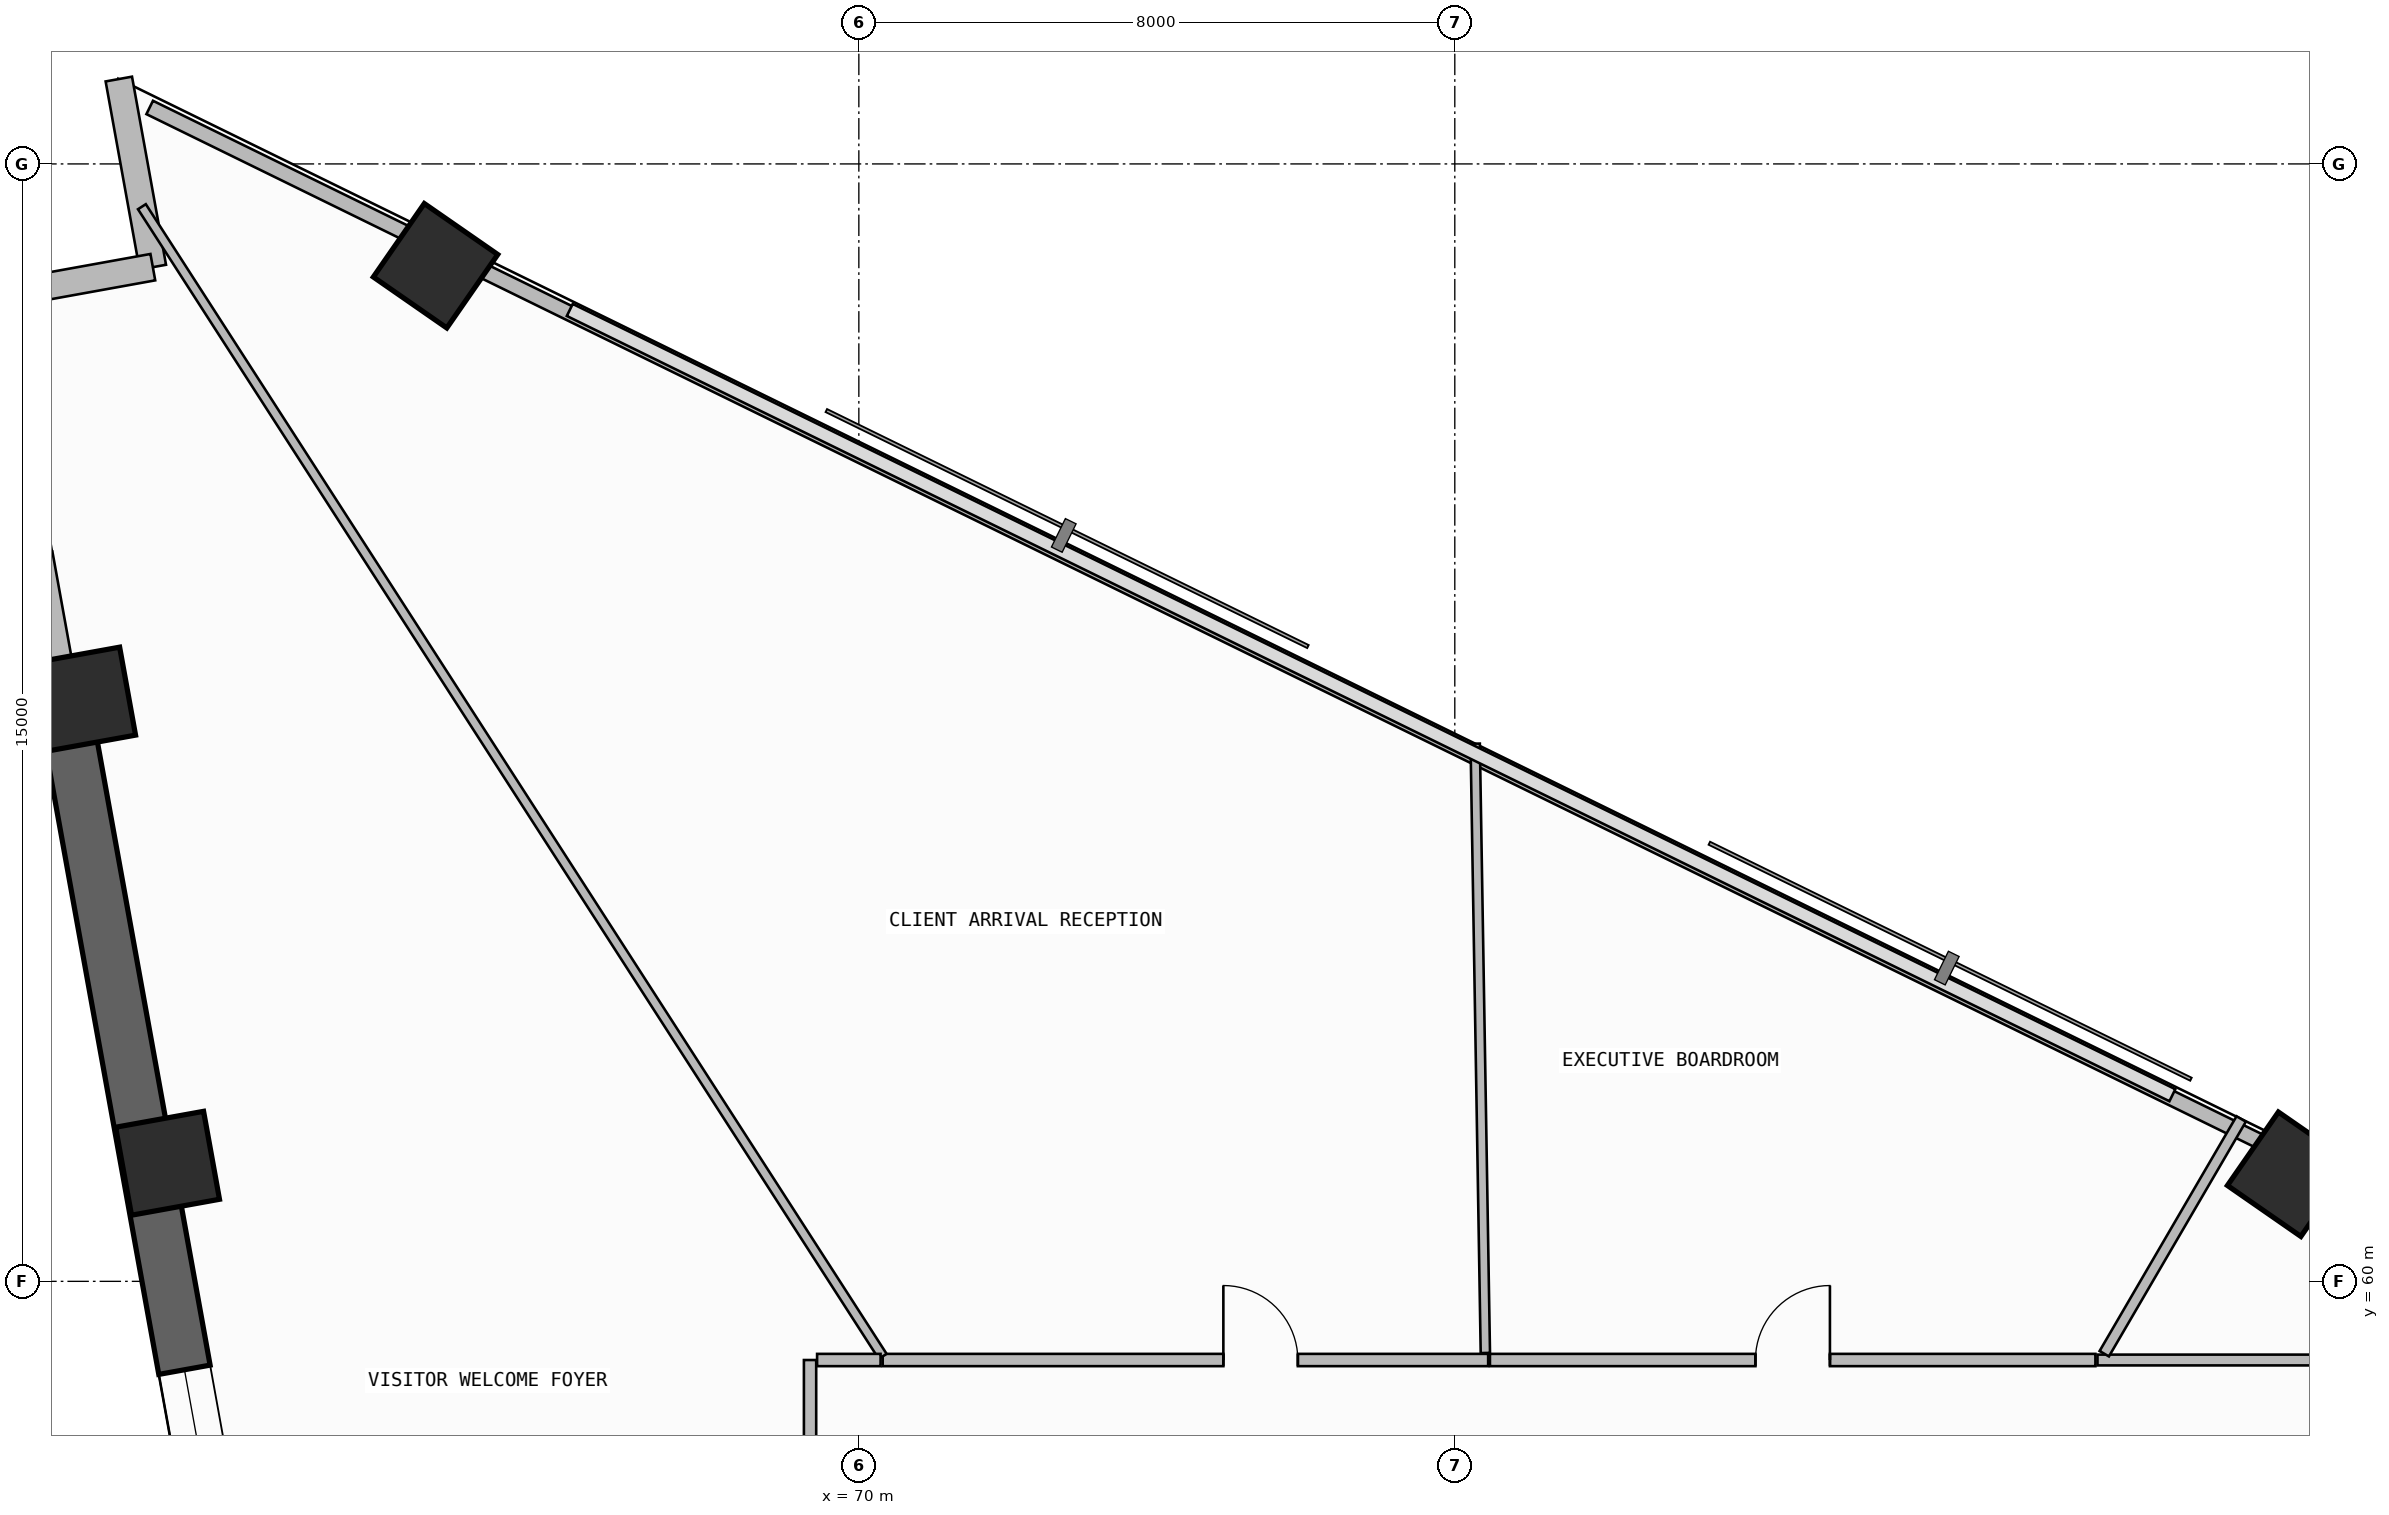
"""IFC4 building model, lengths in metres.
Left out: names, types, materials, properties, quantities, classifications, styles, units other than length and angle.
Written with IfcOpenShell. Run it as: python <this file> out.ifc"""

import sys

from ifc_helpers import new_model, si_unit, direction, frame, frame_2d, origin, origin_2d, place, context, subcontext, project, spatial, rectangle, extrude, element, fill, save


model = new_model("IFC4")
c1 = context("Model", 3, precision=1e-05, world=origin(), true_north=direction((0.0, 1.0)))
c2 = subcontext(c1, "Body", "Model", "MODEL_VIEW")
j1 = project(units=[si_unit("LENGTHUNIT", "METRE"), si_unit("PLANEANGLEUNIT", "RADIAN")], contexts=[c1])
p1 = place(None, origin())
s1 = spatial("IfcSite", under=j1, at=p1, CompositionType="ELEMENT")
p2 = place(p1, origin())
s2 = spatial("IfcBuilding", under=s1, at=p2, CompositionType="ELEMENT")
p3 = place(p2, frame((0.0, 0.0, 95.7)))
s3 = spatial("IfcBuildingStorey", under=s2, at=p3, CompositionType="ELEMENT", Elevation=95.7)
p4 = place(p3, frame((89.207, 61.438, 0.0), z_axis=(0.0, 0.0, 1.0), x_axis=(0.569996762596, 0.821646937942, 0.0)))
e1 = element("IfcColumn", 1, at=p4, inside=s3, PredefinedType="COLUMN", context=c2, shape_type="SweptSolid", body=[
    extrude(rectangle(XDim=1.2, YDim=1.2, at=origin_2d()), origin(), (0.0, 0.0, 1.0), 3.6),
])
for number, where, z_axis, x_axis in (
    (2, (64.318, 73.633, -0.4), (0.0, 0.0, 1.0), (0.57, 0.822, 0.0)),
    (3, (59.594, 67.816, -0.4), (0.0, 0.0, 1.0), (-0.178, 0.984, 0.0)),
    (4, (60.72, 61.585, -0.4), (0.0, 0.0, 1.0), (-0.178, 0.984, 0.0)),
):
    element("IfcColumn", number, at=place(p3, frame(where, z_axis=z_axis, x_axis=x_axis)), inside=s3, PredefinedType="COLUMN", context=c2, shape_type="SweptSolid", body=[
        extrude(rectangle(XDim=1.2, YDim=1.2, at=origin_2d()), origin(), (0.0, 0.0, 1.0), 4.0),
    ])
p5 = place(p3, frame((58.342, 73.22, 0.0), z_axis=(0.0, 0.0, 1.0), x_axis=(0.177981837245, -0.984033772597, 0.0)))
e5 = element("IfcWall", 5, at=p5, inside=s3, PredefinedType="SOLIDWALL", context=c2, shape_type="SweptSolid", body=[
    extrude(rectangle(XDim=5.54, YDim=0.42, at=frame_2d((2.77, 0.0))), origin(), (0.0, 0.0, 1.0), 2.725),
])
p6 = place(p5, frame((1.118, 0.0, 1.2)))
e6 = element("IfcOpeningElement", 6, at=p6, cuts=e5, PredefinedType="OPENING", context=c2, shape_type="SweptSolid", body=[
    extrude(rectangle(XDim=2.4, YDim=0.9, at=frame_2d((1.2, 0.45))), frame((0.0, 0.22, 0.0), z_axis=(0.0, -1.0, 0.0), x_axis=(1.0, 0.0, 0.0)), (0.0, 0.0, 1.0), 0.44),
])
p7 = place(p3, frame((59.328, 67.768, -0.4), z_axis=(0.0, 0.0, 1.0), x_axis=(0.177933213615, -0.984042565895, 0.0)))
e7 = element("IfcWall", 7, at=p7, inside=s3, PredefinedType="SHEAR", context=c2, shape_type="SweptSolid", body=[
    extrude(rectangle(XDim=20.579, YDim=0.7, at=frame_2d((10.289, 0.0))), origin(), (0.0, 0.0, 1.0), 3.74),
])
p8 = place(p7, frame((9.1, 0.0, 1.2)))
e8 = element("IfcOpeningElement", 8, at=p8, cuts=e7, PredefinedType="OPENING", context=c2, shape_type="SweptSolid", body=[
    extrude(rectangle(XDim=2.4, YDim=0.9, at=frame_2d((1.2, 0.45))), frame((0.0, 0.36, 0.0), z_axis=(0.0, -1.0, 0.0), x_axis=(1.0, 0.0, 0.0)), (0.0, 0.0, 1.0), 0.72),
])
p9 = place(p3, frame((60.066, 76.139, 0.0), z_axis=(0.0, 0.0, 1.0), x_axis=(0.177897493713, -0.984049024048, 0.0)))
e9 = element("IfcWall", 9, at=p9, inside=s3, PredefinedType="SOLIDWALL", context=c2, shape_type="SweptSolid", body=[
    extrude(rectangle(XDim=2.566, YDim=0.36, at=frame_2d((1.283, 0.0))), origin(), (0.0, 0.0, 1.0), 3.34),
])
p10 = place(p3, frame((60.523, 73.614, 0.0), z_axis=(0.0, 0.0, 1.0), x_axis=(-0.984046012923, -0.177914149102, 0.0)))
e10 = element("IfcWall", 10, at=p10, inside=s3, PredefinedType="SOLIDWALL", context=c2, shape_type="SweptSolid", body=[
    extrude(rectangle(XDim=2.566, YDim=0.36, at=frame_2d((1.283, 0.0))), origin(), (0.0, 0.0, 1.0), 3.34),
])
p11 = place(p3, frame((88.921, 61.823, 0.0), z_axis=(0.0, 0.0, 1.0), x_axis=(-0.897993533426, 0.440008652103, 0.0)))
e11 = element("IfcWall", 11, at=p11, inside=s3, PredefinedType="PARAPET", context=c2, shape_type="SweptSolid", body=[
    extrude(rectangle(XDim=26.864, YDim=0.2, at=frame_2d((13.432, 0.0))), origin(), (0.0, 0.0, 1.0), 1.15),
])
p12 = place(p3, frame((64.032, 74.018, 0.0), z_axis=(0.0, 0.0, 1.0), x_axis=(-0.89799103332, 0.440013754417, 0.0)))
e12 = element("IfcWall", 12, at=p12, inside=s3, PredefinedType="PARAPET", context=c2, shape_type="SweptSolid", body=[
    extrude(rectangle(XDim=3.955, YDim=0.2, at=frame_2d((1.978, 0.0))), origin(), (0.0, 0.0, 1.0), 1.15),
])
p13 = place(p3, frame((93.37, 58.944, 0.0), z_axis=(0.0, 0.0, 1.0), x_axis=(-1.0, 0.0, 0.0)))
e13 = element("IfcWall", 13, at=p13, inside=s3, PredefinedType="PARTITIONING", context=c2, shape_type="SweptSolid", body=[
    extrude(rectangle(XDim=6.743, YDim=0.145, at=frame_2d((3.372, 0.0))), origin(), (0.0, 0.0, 1.0), 2.725),
])
p14 = place(p3, frame((86.718, 59.029, 0.0), z_axis=(0.0, 0.0, 1.0), x_axis=(0.503866864473, 0.863781328165, 0.0)))
e14 = element("IfcWall", 14, at=p14, inside=s3, PredefinedType="PARTITIONING", context=c2, shape_type="SweptSolid", body=[
    extrude(rectangle(XDim=3.648, YDim=0.145, at=frame_2d((1.824, 0.0))), origin(), (0.0, 0.0, 1.0), 3.34),
])
p15 = place(p3, frame((78.448, 58.944, 0.0), z_axis=(0.0, 0.0, 1.0), x_axis=(-1.0, 0.0, 0.0)))
e15 = element("IfcWall", 15, at=p15, inside=s3, PredefinedType="PARTITIONING", context=c2, shape_type="SweptSolid", body=[
    extrude(rectangle(XDim=8.127, YDim=0.165, at=frame_2d((4.064, 0.0))), origin(), (0.0, 0.0, 1.0), 2.725),
])
p16 = place(p15, frame((2.555, 0.0, 0.0)))
e16 = element("IfcOpeningElement", 16, at=p16, cuts=e15, PredefinedType="OPENING", context=c2, shape_type="SweptSolid", body=[
    extrude(rectangle(XDim=1.0, YDim=2.2, at=frame_2d((0.5, 1.1))), frame((0.0, 0.093, 0.0), z_axis=(0.0, -1.0, 0.0), x_axis=(1.0, 0.0, 0.0)), (0.0, 0.0, 1.0), 0.185),
])
p17 = place(p3, frame((78.274, 67.218, 0.0), z_axis=(0.0, 0.0, 1.0), x_axis=(0.016682750971, -0.999860833226, 0.0)))
e17 = element("IfcWall", 17, at=p17, inside=s3, PredefinedType="PARTITIONING", context=c2, shape_type="SweptSolid", body=[
    extrude(rectangle(XDim=8.181, YDim=0.125, at=frame_2d((4.09, 0.0))), origin(), (0.0, 0.0, 1.0), 3.34),
])
p18 = place(p3, frame((70.32, 58.993, 0.0), z_axis=(0.0, 0.0, 1.0), x_axis=(-0.54165184829, 0.840602923647, 0.0)))
e18 = element("IfcWall", 18, at=p18, inside=s3, PredefinedType="PARTITIONING", context=c2, shape_type="SweptSolid", body=[
    extrude(rectangle(XDim=18.359, YDim=0.125, at=frame_2d((9.18, 0.0))), origin(), (0.0, 0.0, 1.0), 2.725),
])
p19 = place(p3, frame((86.599, 58.944, 0.0), z_axis=(0.0, 0.0, 1.0), x_axis=(-1.0, 0.0, 0.0)))
e19 = element("IfcWall", 19, at=p19, inside=s3, PredefinedType="PARTITIONING", context=c2, shape_type="SweptSolid", body=[
    extrude(rectangle(XDim=8.128, YDim=0.165, at=frame_2d((4.064, 0.0))), origin(), (0.0, 0.0, 1.0), 3.34),
])
p20 = place(p19, frame((3.564, 0.0, 0.0)))
e20 = element("IfcOpeningElement", 20, at=p20, cuts=e19, PredefinedType="OPENING", context=c2, shape_type="SweptSolid", body=[
    extrude(rectangle(XDim=1.0, YDim=2.2, at=frame_2d((0.5, 1.1))), frame((0.0, 0.093, 0.0), z_axis=(0.0, -1.0, 0.0), x_axis=(1.0, 0.0, 0.0)), (0.0, 0.0, 1.0), 0.185),
])
p21 = place(p3, frame((69.345, 58.944, 0.0), z_axis=(0.0, 0.0, 1.0), x_axis=(0.0, -1.0, 0.0)))
e21 = element("IfcWall", 21, at=p21, inside=s3, PredefinedType="PARTITIONING", context=c2, shape_type="SweptSolid", body=[
    extrude(rectangle(XDim=11.028, YDim=0.165, at=frame_2d((5.514, 0.0))), origin(), (0.0, 0.0, 1.0), 2.725),
])
p22 = place(p21, frame((7.71, 0.0, 0.0)))
e22 = element("IfcOpeningElement", 22, at=p22, cuts=e21, PredefinedType="OPENING", context=c2, shape_type="SweptSolid", body=[
    extrude(rectangle(XDim=1.0, YDim=2.2, at=frame_2d((0.5, 1.1))), frame((0.0, 0.093, 0.0), z_axis=(0.0, -1.0, 0.0), x_axis=(1.0, 0.0, 0.0)), (0.0, 0.0, 1.0), 0.185),
])
p23 = place(p3, frame((70.292, 58.944, 0.0), z_axis=(0.0, 0.0, 1.0), x_axis=(-1.0, 0.0, 0.0)))
e23 = element("IfcWall", 23, at=p23, inside=s3, PredefinedType="PARTITIONING", context=c2, shape_type="SweptSolid", body=[
    extrude(rectangle(XDim=0.852, YDim=0.165, at=frame_2d((0.426, 0.0))), origin(), (0.0, 0.0, 1.0), 2.725),
])
p24 = place(p8, origin())
e24 = element("IfcWindow", 24, at=p24, inside=s3, PartitioningType="SINGLE_PANEL", PredefinedType="WINDOW", context=c2, shape_type="SweptSolid", body=[
    extrude(rectangle(XDim=2.4, YDim=0.9, at=frame_2d((1.2, 0.45))), frame((0.0, 0.03, 0.0), z_axis=(0.0, -1.0, 0.0), x_axis=(1.0, 0.0, 0.0)), (0.0, 0.0, 1.0), 0.06),
])
fill(e8, e24)
p25 = place(p16, frame((1.0, 0.0, 0.0), z_axis=(0.0, 0.0, 1.0), x_axis=(-1.0, 0.0, 0.0)))
e25 = element("IfcDoor", 25, at=p25, inside=s3, OperationType="SINGLE_SWING_LEFT", PredefinedType="DOOR", context=c2, shape_type="SweptSolid", body=[
    extrude(rectangle(XDim=1.0, YDim=2.2, at=frame_2d((0.5, 1.1))), frame((0.0, 0.025, 0.0), z_axis=(0.0, -1.0, 0.0), x_axis=(1.0, 0.0, 0.0)), (0.0, 0.0, 1.0), 0.05),
])
fill(e16, e25)
p26 = place(p20, frame((1.0, 0.0, 0.0), z_axis=(0.0, 0.0, 1.0), x_axis=(-1.0, 0.0, 0.0)))
e26 = element("IfcDoor", 26, at=p26, inside=s3, OperationType="SINGLE_SWING_RIGHT", PredefinedType="DOOR", context=c2, shape_type="SweptSolid", body=[
    extrude(rectangle(XDim=1.0, YDim=2.2, at=frame_2d((0.5, 1.1))), frame((0.0, 0.025, 0.0), z_axis=(0.0, -1.0, 0.0), x_axis=(1.0, 0.0, 0.0)), (0.0, 0.0, 1.0), 0.05),
])
fill(e20, e26)
save(model, sys.argv[1])
